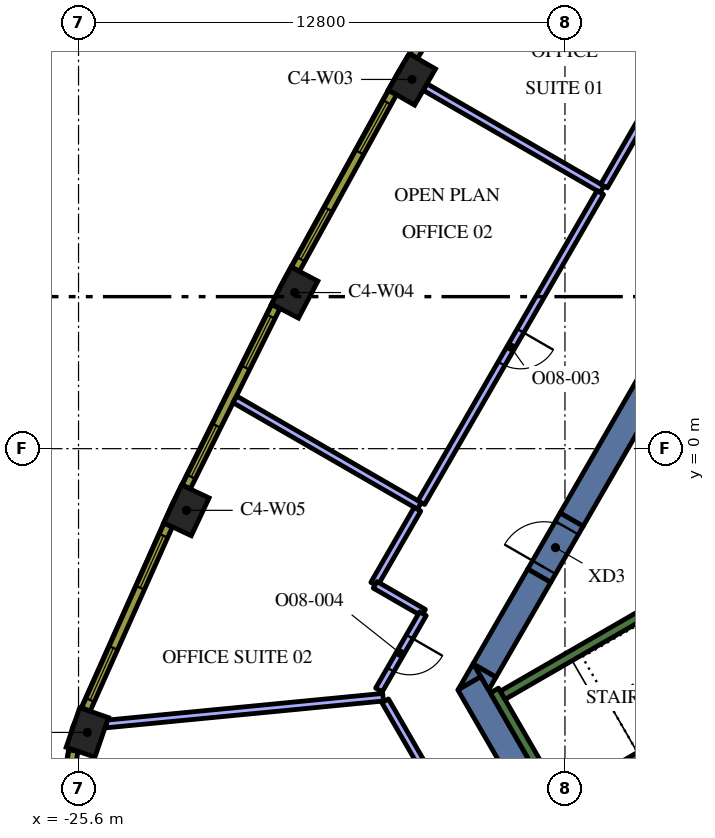
"""IFC4 building model, lengths in metres.
Left out: names, types, materials, properties, quantities, classifications, styles, units other than length and angle.
Written with IfcOpenShell. Run it as: python <this file> out.ifc"""

import sys

from ifc_helpers import new_model, si_unit, direction, frame, frame_2d, origin, origin_2d, place, context, subcontext, project, spatial, polyline, rectangle, outline, extrude, element, fill, save


model = new_model("IFC4")
c1 = context("Model", 3, precision=1e-05, world=origin(), true_north=direction((0.0, 1.0)))
c2 = subcontext(c1, "Body", "Model", "MODEL_VIEW")
j1 = project(units=[si_unit("LENGTHUNIT", "METRE"), si_unit("PLANEANGLEUNIT", "RADIAN")], contexts=[c1])
p1 = place(None, origin())
s1 = spatial("IfcSite", under=j1, at=p1, CompositionType="ELEMENT")
p2 = place(p1, origin())
s2 = spatial("IfcBuilding", under=s1, at=p2, CompositionType="ELEMENT")
p3 = place(p2, frame((0.0, 0.0, 235.2)))
s3 = spatial("IfcBuildingStorey", under=s2, at=p3, CompositionType="ELEMENT", Elevation=235.2)
for number, where, z_axis, x_axis in (
    (1, (-16.827, 9.715, 0.0), (0.0, 0.0, 1.0), (-0.5, -0.866, 0.0)),
    (2, (-19.912, 4.108, 0.0), (0.0, 0.0, 1.0), (-0.464, -0.886, 0.0)),
    (3, (-22.76, -1.623, 0.0), (0.0, 0.0, 1.0), (-0.426, -0.905, 0.0)),
    (4, (-25.369, -7.466, 0.0), (0.0, 0.0, 1.0), (-0.324, -0.946, 0.0)),
):
    element("IfcColumn", number, at=place(p3, frame(where, z_axis=z_axis, x_axis=x_axis)), inside=s3, PredefinedType="COLUMN", context=c2, shape_type="SweptSolid", body=[
        extrude(rectangle(XDim=1.1, YDim=0.8, at=origin_2d()), origin(), (0.0, 0.0, 1.0), 4.2),
    ])
p4 = place(p3, frame((-13.402, -9.487, 0.0), z_axis=(0.0, 0.0, 1.0), x_axis=(-0.500020498207, 0.866013568815, 0.0)))
e5 = element("IfcWall", 5, at=p4, inside=s3, PredefinedType="SOLIDWALL", context=c2, shape_type="SweptSolid", body=[
    extrude(rectangle(XDim=3.829, YDim=0.7, at=frame_2d((1.915, 0.0))), origin(), (0.0, 0.0, 1.0), 4.2),
])
p5 = place(p3, origin())
e6 = element("IfcWall", 6, at=p5, inside=s3, PredefinedType="SOLIDWALL", context=c2, shape_type="SweptSolid", body=[
    extrude(outline(polyline([(-15.014, -5.995), (-15.611, -6.339), (-15.213, -5.65), (-15.014, -5.995)])), origin(), (0.0, 0.0, 1.0), 4.2),
])
p6 = place(p3, frame((-13.475, -3.339, 0.0), z_axis=(0.0, 0.0, 1.0), x_axis=(-0.499944726303, -0.866057313716, 0.0)))
e7 = element("IfcWall", 7, at=p6, inside=s3, PredefinedType="SOLIDWALL", context=c2, shape_type="SweptSolid", body=[
    extrude(rectangle(XDim=2.884, YDim=0.7, at=frame_2d((1.442, 0.0))), origin(), (0.0, 0.0, 1.0), 4.2),
])
e8 = element("IfcWall", 8, at=p5, inside=s3, PredefinedType="SOLIDWALL", context=c2, shape_type="SweptSolid", body=[
    extrude(outline(polyline([(-14.809, -6.35), (-15.197, -5.678), (-14.615, -6.014), (-14.809, -6.35)])), origin(), (0.0, 0.0, 1.0), 4.2),
])
p7 = place(p3, frame((-12.625, -1.867, 0.0), z_axis=(0.0, 0.0, 1.0), x_axis=(0.500008520515, 0.866020484407, 0.0)))
e9 = element("IfcWall", 9, at=p7, inside=s3, PredefinedType="SOLIDWALL", context=c2, shape_type="SweptSolid", body=[
    extrude(rectangle(XDim=15.859, YDim=0.7, at=frame_2d((7.929, 0.0))), origin(), (0.0, 0.0, 1.0), 4.2),
])
p8 = place(p3, frame((-12.84, -9.511, 0.0), z_axis=(0.0, 0.0, 1.0), x_axis=(-0.499997733992, 0.866026712061, 0.0)))
e10 = element("IfcWall", 10, at=p8, inside=s3, PredefinedType="SOLIDWALL", context=c2, shape_type="SweptSolid", body=[
    extrude(rectangle(XDim=3.634, YDim=0.25, at=frame_2d((1.817, 0.0))), origin(), (0.0, 0.0, 1.0), 4.2),
])
p9 = place(p3, frame((-14.44, -6.49, 0.0), z_axis=(0.0, 0.0, 1.0), x_axis=(0.866022966069, 0.500004222222, 0.0)))
e11 = element("IfcWall", 11, at=p9, inside=s3, PredefinedType="SOLIDWALL", context=c2, shape_type="SweptSolid", body=[
    extrude(rectangle(XDim=6.8, YDim=0.25, at=frame_2d((3.4, 0.0))), origin(), (0.0, 0.0, 1.0), 4.2),
])
p10 = place(p3, frame((-12.84, -9.261, 0.0), z_axis=(0.0, 0.0, 1.0), x_axis=(0.866016039709, 0.500016218704, 0.0)))
e12 = element("IfcWall", 12, at=p10, inside=s3, PredefinedType="SOLIDWALL", context=c2, shape_type="SweptSolid", body=[
    extrude(rectangle(XDim=7.05, YDim=0.25, at=frame_2d((3.525, 0.0))), origin(), (0.0, 0.0, 1.0), 4.2),
])
p11 = place(p3, frame((-13.475, -3.339, 0.0), z_axis=(0.0, 0.0, 1.0), x_axis=(0.499954529098, 0.86605165483, 0.0)))
e13 = element("IfcWall", 13, at=p11, inside=s3, PredefinedType="SOLIDWALL", context=c2, shape_type="SweptSolid", body=[
    extrude(rectangle(XDim=1.7, YDim=0.7, at=frame_2d((0.85, 0.0))), origin(), (0.0, 0.0, 1.0), 4.2),
])
p12 = place(p11, frame((0.25, 0.0, 0.0)))
e14 = element("IfcOpeningElement", 14, at=p12, cuts=e13, PredefinedType="OPENING", context=c2, shape_type="SweptSolid", body=[
    extrude(rectangle(XDim=1.2, YDim=2.1, at=frame_2d((0.6, 1.05))), frame((0.0, 0.36, 0.0), z_axis=(0.0, -1.0, 0.0), x_axis=(1.0, 0.0, 0.0)), (0.0, 0.0, 1.0), 0.72),
])
p13 = place(p3, frame((-11.821, 6.825, 0.0), z_axis=(0.0, 0.0, 1.0), x_axis=(-0.866011792348, 0.500023574959, 0.0)))
e15 = element("IfcWall", 15, at=p13, inside=s3, PredefinedType="PARTITIONING", context=c2, shape_type="SweptSolid", body=[
    extrude(rectangle(XDim=5.381, YDim=0.2, at=frame_2d((2.69, 0.0))), origin(), (0.0, 0.0, 1.0), 3.45),
])
p14 = place(p3, frame((-7.061, 15.069, 0.0), z_axis=(0.0, 0.0, 1.0), x_axis=(-0.500008127286, -0.866020711443, 0.0)))
e16 = element("IfcWall", 16, at=p14, inside=s3, PredefinedType="PARTITIONING", context=c2, shape_type="SweptSolid", body=[
    extrude(rectangle(XDim=9.42, YDim=0.2, at=frame_2d((4.71, 0.0))), origin(), (0.0, 0.0, 1.0), 3.45),
])
p15 = place(p14, frame((4.2, 0.0, 0.0)))
e17 = element("IfcOpeningElement", 17, at=p15, cuts=e16, PredefinedType="OPENING", context=c2, shape_type="SweptSolid", body=[
    extrude(rectangle(XDim=1.0, YDim=2.1, at=frame_2d((0.5, 1.05))), frame((0.0, 0.11, 0.0), z_axis=(0.0, -1.0, 0.0), x_axis=(1.0, 0.0, 0.0)), (0.0, 0.0, 1.0), 0.22),
])
p16 = place(p3, frame((-16.631, -1.506, 0.0), z_axis=(0.0, 0.0, 1.0), x_axis=(-0.866045655253, 0.499964921787, 0.0)))
e18 = element("IfcWall", 18, at=p16, inside=s3, PredefinedType="PARTITIONING", context=c2, shape_type="SweptSolid", body=[
    extrude(rectangle(XDim=5.607, YDim=0.2, at=frame_2d((2.804, 0.0))), origin(), (0.0, 0.0, 1.0), 3.45),
])
p17 = place(p3, frame((-11.871, 6.738, 0.0), z_axis=(0.0, 0.0, 1.0), x_axis=(-0.500019350398, -0.866014231539, 0.0)))
e19 = element("IfcWall", 19, at=p17, inside=s3, PredefinedType="PARTITIONING", context=c2, shape_type="SweptSolid", body=[
    extrude(rectangle(XDim=9.42, YDim=0.2, at=frame_2d((4.71, 0.0))), origin(), (0.0, 0.0, 1.0), 3.45),
])
p18 = place(p17, frame((4.2, 0.0, 0.0)))
e20 = element("IfcOpeningElement", 20, at=p18, cuts=e19, PredefinedType="OPENING", context=c2, shape_type="SweptSolid", body=[
    extrude(rectangle(XDim=1.0, YDim=2.1, at=frame_2d((0.5, 1.05))), frame((0.0, 0.11, 0.0), z_axis=(0.0, -1.0, 0.0), x_axis=(1.0, 0.0, 0.0)), (0.0, 0.0, 1.0), 0.22),
])
p19 = place(p3, frame((-17.586, -6.54, 0.0), z_axis=(0.0, 0.0, 1.0), x_axis=(-0.995357542522, -0.096246363795, 0.0)))
e21 = element("IfcWall", 21, at=p19, inside=s3, PredefinedType="PARTITIONING", context=c2, shape_type="SweptSolid", body=[
    extrude(rectangle(XDim=7.318, YDim=0.2, at=frame_2d((3.659, 0.0))), origin(), (0.0, 0.0, 1.0), 3.45),
])
p20 = place(p3, frame((-16.681, -1.593, 0.0), z_axis=(0.0, 0.0, 1.0), x_axis=(-0.499985038317, -0.866034041744, 0.0)))
e22 = element("IfcWall", 22, at=p20, inside=s3, PredefinedType="PARTITIONING", context=c2, shape_type="SweptSolid", body=[
    extrude(rectangle(XDim=2.28, YDim=0.2, at=frame_2d((1.14, 0.0))), origin(), (0.0, 0.0, 1.0), 3.45),
])
p21 = place(p3, frame((-17.795, -3.582, 0.0), z_axis=(0.0, 0.0, 1.0), x_axis=(0.866016893711, -0.50001473959, 0.0)))
e23 = element("IfcWall", 23, at=p21, inside=s3, PredefinedType="PARTITIONING", context=c2, shape_type="SweptSolid", body=[
    extrude(rectangle(XDim=1.47, YDim=0.2, at=frame_2d((0.735, 0.0))), origin(), (0.0, 0.0, 1.0), 3.45),
])
p22 = place(p3, frame((-16.537, -4.343, 0.0), z_axis=(0.0, 0.0, 1.0), x_axis=(-0.500014285048, -0.866017156151, 0.0)))
e24 = element("IfcWall", 24, at=p22, inside=s3, PredefinedType="PARTITIONING", context=c2, shape_type="SweptSolid", body=[
    extrude(rectangle(XDim=2.317, YDim=0.2, at=frame_2d((1.159, 0.0))), origin(), (0.0, 0.0, 1.0), 3.45),
])
p23 = place(p22, frame((0.7, 0.0, 0.0)))
e25 = element("IfcOpeningElement", 25, at=p23, cuts=e24, PredefinedType="OPENING", context=c2, shape_type="SweptSolid", body=[
    extrude(rectangle(XDim=1.0, YDim=2.1, at=frame_2d((0.5, 1.05))), frame((0.0, 0.11, 0.0), z_axis=(0.0, -1.0, 0.0), x_axis=(1.0, 0.0, 0.0)), (0.0, 0.0, 1.0), 0.22),
])
p24 = place(p3, frame((-17.531, -6.635, 0.0), z_axis=(0.0, 0.0, 1.0), x_axis=(0.500009459589, -0.866019942219, 0.0)))
e26 = element("IfcWall", 26, at=p24, inside=s3, PredefinedType="PARTITIONING", context=c2, shape_type="SweptSolid", body=[
    extrude(rectangle(XDim=6.038, YDim=0.2, at=frame_2d((3.019, 0.0))), origin(), (0.0, 0.0, 1.0), 3.45),
])
p25 = place(p24, frame((2.5, 0.0, 0.0)))
e27 = element("IfcOpeningElement", 27, at=p25, cuts=e26, PredefinedType="OPENING", context=c2, shape_type="SweptSolid", body=[
    extrude(rectangle(XDim=1.0, YDim=2.1, at=frame_2d((0.5, 1.05))), frame((0.0, 0.11, 0.0), z_axis=(0.0, -1.0, 0.0), x_axis=(1.0, 0.0, 0.0)), (0.0, 0.0, 1.0), 0.22),
])
p26 = place(p3, frame((-14.038, 14.864, 0.0), z_axis=(0.0, 0.0, 1.0), x_axis=(-0.517846166225, -0.855473756538, 0.0)))
e28 = element("IfcWall", 28, at=p26, inside=s3, PredefinedType="SOLIDWALL", context=c2, shape_type="SweptSolid", body=[
    extrude(rectangle(XDim=5.298, YDim=0.24, at=frame_2d((2.649, 0.0))), origin(), (0.0, 0.0, 1.0), 3.95),
])
p27 = place(p26, frame((0.294, 0.0, 0.9)))
e29 = element("IfcOpeningElement", 29, at=p27, cuts=e28, PredefinedType="OPENING", context=c2, shape_type="SweptSolid", body=[
    extrude(rectangle(XDim=1.5, YDim=2.55, at=frame_2d((0.75, 1.275))), frame((0.0, 0.13, 0.0), z_axis=(0.0, -1.0, 0.0), x_axis=(1.0, 0.0, 0.0)), (0.0, 0.0, 1.0), 0.26),
])
p28 = place(p26, frame((3.504, 0.0, 0.9)))
e30 = element("IfcOpeningElement", 30, at=p28, cuts=e28, PredefinedType="OPENING", context=c2, shape_type="SweptSolid", body=[
    extrude(rectangle(XDim=1.5, YDim=2.55, at=frame_2d((0.75, 1.275))), frame((0.0, 0.13, 0.0), z_axis=(0.0, -1.0, 0.0), x_axis=(1.0, 0.0, 0.0)), (0.0, 0.0, 1.0), 0.26),
])
p29 = place(p3, frame((-17.338, 9.368, 0.0), z_axis=(0.0, 0.0, 1.0), x_axis=(-0.481925825015, -0.876212017256, 0.0)))
e31 = element("IfcWall", 31, at=p29, inside=s3, PredefinedType="SOLIDWALL", context=c2, shape_type="SweptSolid", body=[
    extrude(rectangle(XDim=5.299, YDim=0.24, at=frame_2d((2.649, 0.0))), origin(), (0.0, 0.0, 1.0), 3.95),
])
p30 = place(p29, frame((0.295, 0.0, 0.9)))
e32 = element("IfcOpeningElement", 32, at=p30, cuts=e31, PredefinedType="OPENING", context=c2, shape_type="SweptSolid", body=[
    extrude(rectangle(XDim=1.5, YDim=2.55, at=frame_2d((0.75, 1.275))), frame((0.0, 0.13, 0.0), z_axis=(0.0, -1.0, 0.0), x_axis=(1.0, 0.0, 0.0)), (0.0, 0.0, 1.0), 0.26),
])
p31 = place(p29, frame((3.504, 0.0, 0.9)))
e33 = element("IfcOpeningElement", 33, at=p31, cuts=e31, PredefinedType="OPENING", context=c2, shape_type="SweptSolid", body=[
    extrude(rectangle(XDim=1.5, YDim=2.55, at=frame_2d((0.75, 1.275))), frame((0.0, 0.13, 0.0), z_axis=(0.0, -1.0, 0.0), x_axis=(1.0, 0.0, 0.0)), (0.0, 0.0, 1.0), 0.26),
])
p32 = place(p3, frame((-20.407, 3.74, 0.0), z_axis=(0.0, 0.0, 1.0), x_axis=(-0.445129582031, -0.895466166419, 0.0)))
e34 = element("IfcWall", 34, at=p32, inside=s3, PredefinedType="SOLIDWALL", context=c2, shape_type="SweptSolid", body=[
    extrude(rectangle(XDim=5.298, YDim=0.24, at=frame_2d((2.649, 0.0))), origin(), (0.0, 0.0, 1.0), 3.95),
])
p33 = place(p32, frame((0.295, 0.0, 0.9)))
e35 = element("IfcOpeningElement", 35, at=p33, cuts=e34, PredefinedType="OPENING", context=c2, shape_type="SweptSolid", body=[
    extrude(rectangle(XDim=1.5, YDim=2.55, at=frame_2d((0.75, 1.275))), frame((0.0, 0.13, 0.0), z_axis=(0.0, -1.0, 0.0), x_axis=(1.0, 0.0, 0.0)), (0.0, 0.0, 1.0), 0.26),
])
p34 = place(p32, frame((3.504, 0.0, 0.9)))
e36 = element("IfcOpeningElement", 36, at=p34, cuts=e34, PredefinedType="OPENING", context=c2, shape_type="SweptSolid", body=[
    extrude(rectangle(XDim=1.5, YDim=2.55, at=frame_2d((0.75, 1.275))), frame((0.0, 0.13, 0.0), z_axis=(0.0, -1.0, 0.0), x_axis=(1.0, 0.0, 0.0)), (0.0, 0.0, 1.0), 0.26),
])
p35 = place(p3, frame((-23.24, -2.011, 0.0), z_axis=(0.0, 0.0, 1.0), x_axis=(-0.407579651789, -0.913169659728, 0.0)))
e37 = element("IfcWall", 37, at=p35, inside=s3, PredefinedType="SOLIDWALL", context=c2, shape_type="SweptSolid", body=[
    extrude(rectangle(XDim=5.311, YDim=0.24, at=frame_2d((2.655, 0.0))), origin(), (0.0, 0.0, 1.0), 3.95),
])
p36 = place(p35, frame((0.306, 0.0, 0.9)))
e38 = element("IfcOpeningElement", 38, at=p36, cuts=e37, PredefinedType="OPENING", context=c2, shape_type="SweptSolid", body=[
    extrude(rectangle(XDim=1.5, YDim=2.55, at=frame_2d((0.75, 1.275))), frame((0.0, 0.13, 0.0), z_axis=(0.0, -1.0, 0.0), x_axis=(1.0, 0.0, 0.0)), (0.0, 0.0, 1.0), 0.26),
])
p37 = place(p35, frame((3.539, 0.0, 0.9)))
e39 = element("IfcOpeningElement", 39, at=p37, cuts=e37, PredefinedType="OPENING", context=c2, shape_type="SweptSolid", body=[
    extrude(rectangle(XDim=1.5, YDim=2.55, at=frame_2d((0.75, 1.275))), frame((0.0, 0.13, 0.0), z_axis=(0.0, -1.0, 0.0), x_axis=(1.0, 0.0, 0.0)), (0.0, 0.0, 1.0), 0.26),
])
p38 = place(p3, frame((-25.734, -7.945, 0.0), z_axis=(0.0, 0.0, 1.0), x_axis=(-0.167660055546, -0.985844869021, 0.0)))
e40 = element("IfcWall", 40, at=p38, inside=s3, PredefinedType="SOLIDWALL", context=c2, shape_type="SweptSolid", body=[
    extrude(rectangle(XDim=2.609, YDim=0.24, at=frame_2d((1.305, 0.0))), origin(), (0.0, 0.0, 1.0), 3.95),
])
p39 = place(p38, frame((0.805, 0.0, 0.9)))
e41 = element("IfcOpeningElement", 41, at=p39, cuts=e40, PredefinedType="OPENING", context=c2, shape_type="SweptSolid", body=[
    extrude(rectangle(XDim=1.0, YDim=2.55, at=frame_2d((0.5, 1.275))), frame((0.0, 0.13, 0.0), z_axis=(0.0, -1.0, 0.0), x_axis=(1.0, 0.0, 0.0)), (0.0, 0.0, 1.0), 0.26),
])
p40 = place(p12, origin())
e42 = element("IfcDoor", 42, at=p40, inside=s3, OperationType="SINGLE_SWING_LEFT", PredefinedType="DOOR", context=c2, shape_type="SweptSolid", body=[
    extrude(rectangle(XDim=1.2, YDim=2.1, at=frame_2d((0.6, 1.05))), frame((0.0, 0.025, 0.0), z_axis=(0.0, -1.0, 0.0), x_axis=(1.0, 0.0, 0.0)), (0.0, 0.0, 1.0), 0.05),
])
fill(e14, e42)
p41 = place(p18, origin())
e43 = element("IfcDoor", 43, at=p41, inside=s3, OperationType="SINGLE_SWING_LEFT", PredefinedType="DOOR", context=c2, shape_type="SweptSolid", body=[
    extrude(rectangle(XDim=1.0, YDim=2.1, at=frame_2d((0.5, 1.05))), frame((0.0, 0.025, 0.0), z_axis=(0.0, -1.0, 0.0), x_axis=(1.0, 0.0, 0.0)), (0.0, 0.0, 1.0), 0.05),
])
fill(e20, e43)
p42 = place(p23, origin())
e44 = element("IfcDoor", 44, at=p42, inside=s3, OperationType="SINGLE_SWING_RIGHT", PredefinedType="DOOR", context=c2, shape_type="SweptSolid", body=[
    extrude(rectangle(XDim=1.0, YDim=2.1, at=frame_2d((0.5, 1.05))), frame((0.0, 0.025, 0.0), z_axis=(0.0, -1.0, 0.0), x_axis=(1.0, 0.0, 0.0)), (0.0, 0.0, 1.0), 0.05),
])
fill(e25, e44)
p43 = place(p30, origin())
e45 = element("IfcWindow", 45, at=p43, inside=s3, PartitioningType="SINGLE_PANEL", PredefinedType="WINDOW", context=c2, shape_type="SweptSolid", body=[
    extrude(rectangle(XDim=1.5, YDim=2.55, at=frame_2d((0.75, 1.275))), frame((0.0, 0.04, 0.0), z_axis=(0.0, -1.0, 0.0), x_axis=(1.0, 0.0, 0.0)), (0.0, 0.0, 1.0), 0.06),
])
fill(e32, e45)
p44 = place(p31, origin())
e46 = element("IfcWindow", 46, at=p44, inside=s3, PartitioningType="SINGLE_PANEL", PredefinedType="WINDOW", context=c2, shape_type="SweptSolid", body=[
    extrude(rectangle(XDim=1.5, YDim=2.55, at=frame_2d((0.75, 1.275))), frame((0.0, 0.04, 0.0), z_axis=(0.0, -1.0, 0.0), x_axis=(1.0, 0.0, 0.0)), (0.0, 0.0, 1.0), 0.06),
])
fill(e33, e46)
p45 = place(p33, origin())
e47 = element("IfcWindow", 47, at=p45, inside=s3, PartitioningType="SINGLE_PANEL", PredefinedType="WINDOW", context=c2, shape_type="SweptSolid", body=[
    extrude(rectangle(XDim=1.5, YDim=2.55, at=frame_2d((0.75, 1.275))), frame((0.0, 0.04, 0.0), z_axis=(0.0, -1.0, 0.0), x_axis=(1.0, 0.0, 0.0)), (0.0, 0.0, 1.0), 0.06),
])
fill(e35, e47)
p46 = place(p34, origin())
e48 = element("IfcWindow", 48, at=p46, inside=s3, PartitioningType="SINGLE_PANEL", PredefinedType="WINDOW", context=c2, shape_type="SweptSolid", body=[
    extrude(rectangle(XDim=1.5, YDim=2.55, at=frame_2d((0.75, 1.275))), frame((0.0, 0.04, 0.0), z_axis=(0.0, -1.0, 0.0), x_axis=(1.0, 0.0, 0.0)), (0.0, 0.0, 1.0), 0.06),
])
fill(e36, e48)
p47 = place(p36, origin())
e49 = element("IfcWindow", 49, at=p47, inside=s3, PartitioningType="SINGLE_PANEL", PredefinedType="WINDOW", context=c2, shape_type="SweptSolid", body=[
    extrude(rectangle(XDim=1.5, YDim=2.55, at=frame_2d((0.75, 1.275))), frame((0.0, 0.04, 0.0), z_axis=(0.0, -1.0, 0.0), x_axis=(1.0, 0.0, 0.0)), (0.0, 0.0, 1.0), 0.06),
])
fill(e38, e49)
p48 = place(p37, origin())
e50 = element("IfcWindow", 50, at=p48, inside=s3, PartitioningType="SINGLE_PANEL", PredefinedType="WINDOW", context=c2, shape_type="SweptSolid", body=[
    extrude(rectangle(XDim=1.5, YDim=2.55, at=frame_2d((0.75, 1.275))), frame((0.0, 0.04, 0.0), z_axis=(0.0, -1.0, 0.0), x_axis=(1.0, 0.0, 0.0)), (0.0, 0.0, 1.0), 0.06),
])
fill(e39, e50)
save(model, sys.argv[1])
